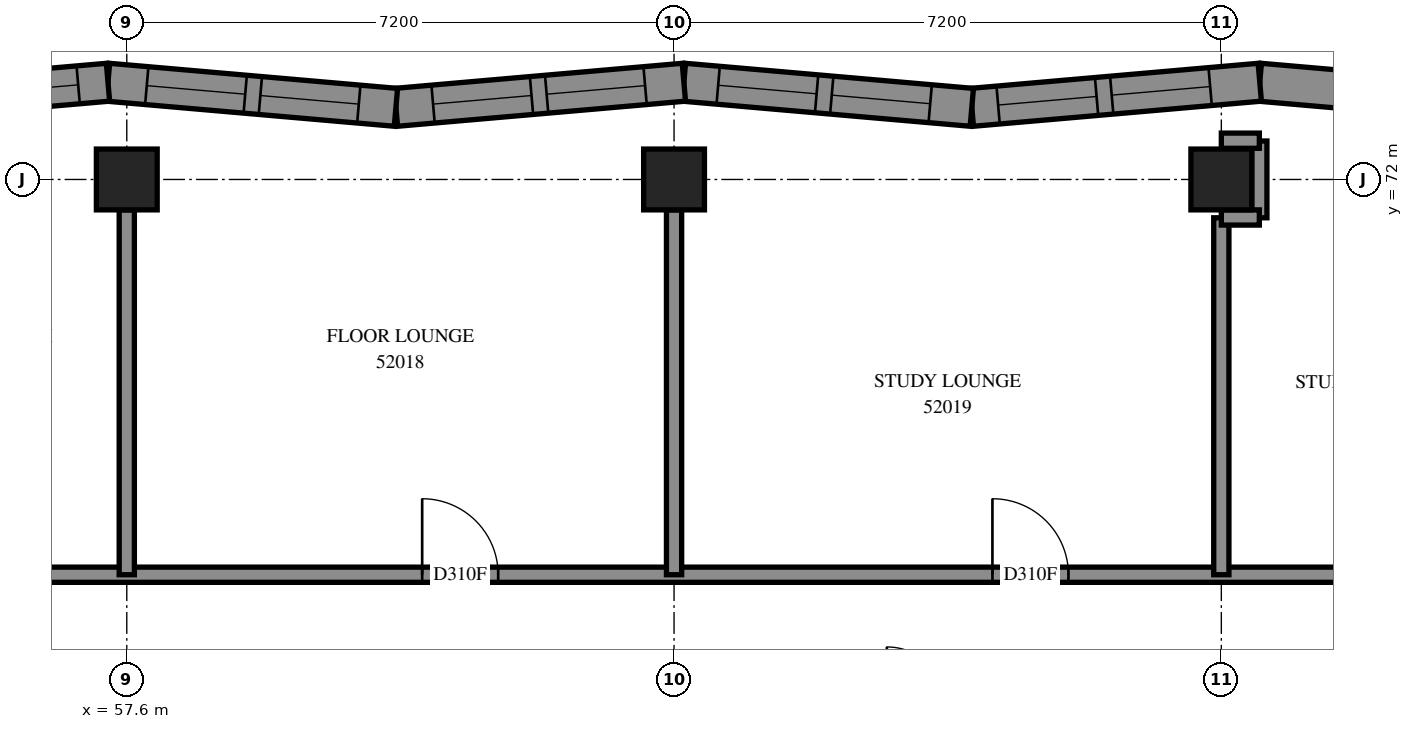
"""IFC4 building model, lengths in metres.
Left out: names, types, materials, properties, quantities, classifications, styles, units other than length and angle.
Written with IfcOpenShell. Run it as: python <this file> out.ifc"""

import sys

from ifc_helpers import new_model, si_unit, direction, frame, frame_2d, origin, origin_2d, place, context, subcontext, project, spatial, polyline, rectangle, outline, extrude, element, fill, save


model = new_model("IFC4")
c1 = context("Model", 3, precision=1e-05, world=origin(), true_north=direction((0.0, 1.0)))
c2 = subcontext(c1, "Body", "Model", "MODEL_VIEW")
j1 = project(units=[si_unit("LENGTHUNIT", "METRE"), si_unit("PLANEANGLEUNIT", "RADIAN")], contexts=[c1])
p1 = place(None, origin())
s1 = spatial("IfcSite", under=j1, at=p1, CompositionType="ELEMENT")
p2 = place(p1, origin())
s2 = spatial("IfcBuilding", under=s1, at=p2, CompositionType="ELEMENT")
p3 = place(p2, frame((0.0, 0.0, 193.0)))
s3 = spatial("IfcBuildingStorey", under=s2, at=p3, CompositionType="ELEMENT", Elevation=193.0)
for number, where, z_axis, x_axis in (
    (1, (57.6, 72.0, 0.0), (0.0, 0.0, 1.0), (1.0, 0.0, 0.0)),
    (2, (64.8, 72.0, 0.0), (0.0, 0.0, 1.0), (1.0, 0.0, 0.0)),
    (3, (72.0, 72.0, 0.0), (0.0, 0.0, 1.0), (1.0, 0.0, 0.0)),
):
    element("IfcColumn", number, at=place(p3, frame(where, z_axis=z_axis, x_axis=x_axis)), inside=s3, PredefinedType="COLUMN", context=c2, shape_type="SweptSolid", body=[
        extrude(rectangle(XDim=0.8, YDim=0.8, at=origin_2d()), origin(), (0.0, 0.0, 1.0), 3.1),
    ])
p4 = place(p3, frame((76.314, 72.947, 0.0), z_axis=(0.0, 0.0, 1.0), x_axis=(-0.9962271263, 0.0867842891, 0.0)))
e4 = element("IfcWall", 4, at=p4, inside=s3, PredefinedType="SOLIDWALL", context=c2, shape_type="SweptSolid", body=[
    extrude(outline(polyline([(0.041, -0.25), (3.844, -0.25), (3.8, 0.25), (-0.041, 0.25), (0.041, -0.25)])), origin(), (0.0, 0.0, 1.0), 3.1),
])
p5 = place(p4, frame((1.558, 0.0, 0.45)))
e5 = element("IfcOpeningElement", 5, at=p5, cuts=e4, PredefinedType="OPENING", context=c2, shape_type="SweptSolid", body=[
    extrude(rectangle(XDim=1.2, YDim=2.5, at=frame_2d((0.6, 1.25))), frame((0.0, 0.26, 0.0), z_axis=(0.0, -1.0, 0.0), x_axis=(1.0, 0.0, 0.0)), (0.0, 0.0, 1.0), 0.52),
])
p6 = place(p3, frame((72.506, 73.279, 0.0), z_axis=(0.0, 0.0, 1.0), x_axis=(-0.9962273538, -0.0867816769, 0.0)))
e6 = element("IfcWall", 6, at=p6, inside=s3, PredefinedType="SOLIDWALL", context=c2, shape_type="SweptSolid", body=[
    extrude(outline(polyline([(-0.022, -0.25), (3.781, -0.25), (3.824, 0.25), (0.022, 0.25), (-0.022, -0.25)])), origin(), (0.0, 0.0, 1.0), 3.1),
])
p7 = place(p6, frame((0.655, 0.0, 0.45)))
e7 = element("IfcOpeningElement", 7, at=p7, cuts=e6, PredefinedType="OPENING", context=c2, shape_type="SweptSolid", body=[
    extrude(rectangle(XDim=1.3, YDim=2.5, at=frame_2d((0.65, 1.25))), frame((0.0, 0.26, 0.0), z_axis=(0.0, -1.0, 0.0), x_axis=(1.0, 0.0, 0.0)), (0.0, 0.0, 1.0), 0.52),
])
p8 = place(p6, frame((2.155, 0.0, 0.45)))
e8 = element("IfcOpeningElement", 8, at=p8, cuts=e6, PredefinedType="OPENING", context=c2, shape_type="SweptSolid", body=[
    extrude(rectangle(XDim=1.3, YDim=2.5, at=frame_2d((0.65, 1.25))), frame((0.0, 0.26, 0.0), z_axis=(0.0, -1.0, 0.0), x_axis=(1.0, 0.0, 0.0)), (0.0, 0.0, 1.0), 0.52),
])
p9 = place(p3, frame((68.718, 72.949, 0.0), z_axis=(0.0, 0.0, 1.0), x_axis=(-0.9962273538, 0.0867816769, 0.0)))
e9 = element("IfcWall", 9, at=p9, inside=s3, PredefinedType="SOLIDWALL", context=c2, shape_type="SweptSolid", body=[
    extrude(outline(polyline([(0.022, -0.25), (3.824, -0.25), (3.781, 0.25), (-0.022, 0.25), (0.022, -0.25)])), origin(), (0.0, 0.0, 1.0), 3.1),
])
p10 = place(p9, frame((0.55, 0.0, 0.45)))
e10 = element("IfcOpeningElement", 10, at=p10, cuts=e9, PredefinedType="OPENING", context=c2, shape_type="SweptSolid", body=[
    extrude(rectangle(XDim=1.3, YDim=2.5, at=frame_2d((0.65, 1.25))), frame((0.0, 0.26, 0.0), z_axis=(0.0, -1.0, 0.0), x_axis=(1.0, 0.0, 0.0)), (0.0, 0.0, 1.0), 0.52),
])
p11 = place(p9, frame((2.05, 0.0, 0.45)))
e11 = element("IfcOpeningElement", 11, at=p11, cuts=e9, PredefinedType="OPENING", context=c2, shape_type="SweptSolid", body=[
    extrude(rectangle(XDim=1.3, YDim=2.5, at=frame_2d((0.65, 1.25))), frame((0.0, 0.26, 0.0), z_axis=(0.0, -1.0, 0.0), x_axis=(1.0, 0.0, 0.0)), (0.0, 0.0, 1.0), 0.52),
])
p12 = place(p3, frame((64.929, 73.279, 0.0), z_axis=(0.0, 0.0, 1.0), x_axis=(-0.9962271558, -0.0867839505, 0.0)))
e12 = element("IfcWall", 12, at=p12, inside=s3, PredefinedType="SOLIDWALL", context=c2, shape_type="SweptSolid", body=[
    extrude(outline(polyline([(-0.022, -0.25), (3.781, -0.25), (3.824, 0.25), (0.022, 0.25), (-0.022, -0.25)])), origin(), (0.0, 0.0, 1.0), 3.1),
])
p13 = place(p12, frame((0.512, 0.0, 0.45)))
e13 = element("IfcOpeningElement", 13, at=p13, cuts=e12, PredefinedType="OPENING", context=c2, shape_type="SweptSolid", body=[
    extrude(rectangle(XDim=1.3, YDim=2.5, at=frame_2d((0.65, 1.25))), frame((0.0, 0.26, 0.0), z_axis=(0.0, -1.0, 0.0), x_axis=(1.0, 0.0, 0.0)), (0.0, 0.0, 1.0), 0.52),
])
p14 = place(p12, frame((2.012, 0.0, 0.45)))
e14 = element("IfcOpeningElement", 14, at=p14, cuts=e12, PredefinedType="OPENING", context=c2, shape_type="SweptSolid", body=[
    extrude(rectangle(XDim=1.3, YDim=2.5, at=frame_2d((0.65, 1.25))), frame((0.0, 0.26, 0.0), z_axis=(0.0, -1.0, 0.0), x_axis=(1.0, 0.0, 0.0)), (0.0, 0.0, 1.0), 0.52),
])
p15 = place(p3, frame((61.141, 72.949, 0.0), z_axis=(0.0, 0.0, 1.0), x_axis=(-0.9962273538, 0.0867816769, 0.0)))
e15 = element("IfcWall", 15, at=p15, inside=s3, PredefinedType="SOLIDWALL", context=c2, shape_type="SweptSolid", body=[
    extrude(outline(polyline([(0.022, -0.25), (3.824, -0.25), (3.781, 0.25), (-0.022, 0.25), (0.022, -0.25)])), origin(), (0.0, 0.0, 1.0), 3.1),
])
p16 = place(p15, frame((0.49, 0.0, 0.45)))
e16 = element("IfcOpeningElement", 16, at=p16, cuts=e15, PredefinedType="OPENING", context=c2, shape_type="SweptSolid", body=[
    extrude(rectangle(XDim=1.3, YDim=2.5, at=frame_2d((0.65, 1.25))), frame((0.0, 0.26, 0.0), z_axis=(0.0, -1.0, 0.0), x_axis=(1.0, 0.0, 0.0)), (0.0, 0.0, 1.0), 0.52),
])
p17 = place(p15, frame((1.99, 0.0, 0.45)))
e17 = element("IfcOpeningElement", 17, at=p17, cuts=e15, PredefinedType="OPENING", context=c2, shape_type="SweptSolid", body=[
    extrude(rectangle(XDim=1.3, YDim=2.5, at=frame_2d((0.65, 1.25))), frame((0.0, 0.26, 0.0), z_axis=(0.0, -1.0, 0.0), x_axis=(1.0, 0.0, 0.0)), (0.0, 0.0, 1.0), 0.52),
])
p18 = place(p3, frame((57.353, 73.279, 0.0), z_axis=(0.0, 0.0, 1.0), x_axis=(-0.9962273538, -0.0867816769, 0.0)))
e18 = element("IfcWall", 18, at=p18, inside=s3, PredefinedType="SOLIDWALL", context=c2, shape_type="SweptSolid", body=[
    extrude(outline(polyline([(-0.022, -0.25), (3.781, -0.25), (3.824, 0.25), (0.022, 0.25), (-0.022, -0.25)])), origin(), (0.0, 0.0, 1.0), 3.1),
])
p19 = place(p18, frame((0.394, 0.0, 0.45)))
e19 = element("IfcOpeningElement", 19, at=p19, cuts=e18, PredefinedType="OPENING", context=c2, shape_type="SweptSolid", body=[
    extrude(rectangle(XDim=1.3, YDim=2.5, at=frame_2d((0.65, 1.25))), frame((0.0, 0.26, 0.0), z_axis=(0.0, -1.0, 0.0), x_axis=(1.0, 0.0, 0.0)), (0.0, 0.0, 1.0), 0.52),
])
p20 = place(p18, frame((1.894, 0.0, 0.45)))
e20 = element("IfcOpeningElement", 20, at=p20, cuts=e18, PredefinedType="OPENING", context=c2, shape_type="SweptSolid", body=[
    extrude(rectangle(XDim=1.3, YDim=2.5, at=frame_2d((0.65, 1.25))), frame((0.0, 0.26, 0.0), z_axis=(0.0, -1.0, 0.0), x_axis=(1.0, 0.0, 0.0)), (0.0, 0.0, 1.0), 0.52),
])
p21 = place(p3, frame((55.6, 66.8, 0.0), z_axis=(0.0, 0.0, 1.0), x_axis=(1.0, 0.0, 0.0)))
e21 = element("IfcWall", 21, at=p21, inside=s3, PredefinedType="PARTITIONING", context=c2, shape_type="SweptSolid", body=[
    extrude(rectangle(XDim=18.4, YDim=0.2, at=frame_2d((9.2, 0.0))), origin(), (0.0, 0.0, 1.0), 3.1),
])
p22 = place(p21, frame((5.886, 0.0, 0.0)))
e22 = element("IfcOpeningElement", 22, at=p22, cuts=e21, PredefinedType="OPENING", context=c2, shape_type="SweptSolid", body=[
    extrude(rectangle(XDim=1.0, YDim=2.1, at=frame_2d((0.5, 1.05))), frame((0.0, 0.11, 0.0), z_axis=(0.0, -1.0, 0.0), x_axis=(1.0, 0.0, 0.0)), (0.0, 0.0, 1.0), 0.22),
])
p23 = place(p21, frame((13.389, 0.0, 0.0)))
e23 = element("IfcOpeningElement", 23, at=p23, cuts=e21, PredefinedType="OPENING", context=c2, shape_type="SweptSolid", body=[
    extrude(rectangle(XDim=1.0, YDim=2.1, at=frame_2d((0.5, 1.05))), frame((0.0, 0.11, 0.0), z_axis=(0.0, -1.0, 0.0), x_axis=(1.0, 0.0, 0.0)), (0.0, 0.0, 1.0), 0.22),
])
for number, where, z_axis, x_axis in (
    (24, (57.6, 66.8, 0.0), (0.0, 0.0, 1.0), (0.0, 1.0, 0.0)),
    (25, (64.8, 66.8, 0.0), (0.0, 0.0, 1.0), (0.0, 1.0, 0.0)),
):
    element("IfcWall", number, at=place(p3, frame(where, z_axis=z_axis, x_axis=x_axis)), inside=s3, PredefinedType="PARTITIONING", context=c2, shape_type="SweptSolid", body=[
        extrude(rectangle(XDim=4.8, YDim=0.2, at=frame_2d((2.4, 0.0))), origin(), (0.0, 0.0, 1.0), 3.1),
    ])
p24 = place(p3, frame((72.0, 66.8, 0.0), z_axis=(0.0, 0.0, 1.0), x_axis=(0.0, 1.0, 0.0)))
e26 = element("IfcWall", 26, at=p24, inside=s3, PredefinedType="PARTITIONING", context=c2, shape_type="SweptSolid", body=[
    extrude(rectangle(XDim=4.696, YDim=0.2, at=frame_2d((2.348, 0.0))), origin(), (0.0, 0.0, 1.0), 3.1),
])
p25 = place(p3, frame((72.5, 71.496, 0.0), z_axis=(0.0, 0.0, 1.0), x_axis=(0.0, 1.0, 0.0)))
e27 = element("IfcWall", 27, at=p25, inside=s3, PredefinedType="PARTITIONING", context=c2, shape_type="SweptSolid", body=[
    extrude(rectangle(XDim=1.01, YDim=0.2, at=frame_2d((0.505, 0.0))), origin(), (0.0, 0.0, 1.0), 3.1),
])
for number, where, z_axis, x_axis in (
    (28, (72.0, 72.51, 0.0), (0.0, 0.0, 1.0), (1.0, 0.0, 0.0)),
    (29, (72.0, 71.5, 0.0), (0.0, 0.0, 1.0), (1.0, 0.0, 0.0)),
):
    element("IfcWall", number, at=place(p3, frame(where, z_axis=z_axis, x_axis=x_axis)), inside=s3, PredefinedType="PARTITIONING", context=c2, shape_type="SweptSolid", body=[
        extrude(rectangle(XDim=0.5, YDim=0.2, at=frame_2d((0.25, 0.0))), origin(), (0.0, 0.0, 1.0), 3.1),
    ])
p26 = place(p7, origin())
e30 = element("IfcWindow", 30, at=p26, inside=s3, PartitioningType="SINGLE_PANEL", PredefinedType="WINDOW", context=c2, shape_type="SweptSolid", body=[
    extrude(rectangle(XDim=1.3, YDim=2.5, at=frame_2d((0.65, 1.25))), frame((0.0, 0.18, 0.0), z_axis=(0.0, -1.0, 0.0), x_axis=(1.0, 0.0, 0.0)), (0.0, 0.0, 1.0), 0.06),
])
fill(e7, e30)
p27 = place(p8, origin())
e31 = element("IfcWindow", 31, at=p27, inside=s3, PartitioningType="SINGLE_PANEL", PredefinedType="WINDOW", context=c2, shape_type="SweptSolid", body=[
    extrude(rectangle(XDim=1.3, YDim=2.5, at=frame_2d((0.65, 1.25))), frame((0.0, 0.18, 0.0), z_axis=(0.0, -1.0, 0.0), x_axis=(1.0, 0.0, 0.0)), (0.0, 0.0, 1.0), 0.06),
])
fill(e8, e31)
p28 = place(p10, origin())
e32 = element("IfcWindow", 32, at=p28, inside=s3, PartitioningType="SINGLE_PANEL", PredefinedType="WINDOW", context=c2, shape_type="SweptSolid", body=[
    extrude(rectangle(XDim=1.3, YDim=2.5, at=frame_2d((0.65, 1.25))), frame((0.0, 0.18, 0.0), z_axis=(0.0, -1.0, 0.0), x_axis=(1.0, 0.0, 0.0)), (0.0, 0.0, 1.0), 0.06),
])
fill(e10, e32)
p29 = place(p11, origin())
e33 = element("IfcWindow", 33, at=p29, inside=s3, PartitioningType="SINGLE_PANEL", PredefinedType="WINDOW", context=c2, shape_type="SweptSolid", body=[
    extrude(rectangle(XDim=1.3, YDim=2.5, at=frame_2d((0.65, 1.25))), frame((0.0, 0.18, 0.0), z_axis=(0.0, -1.0, 0.0), x_axis=(1.0, 0.0, 0.0)), (0.0, 0.0, 1.0), 0.06),
])
fill(e11, e33)
p30 = place(p13, origin())
e34 = element("IfcWindow", 34, at=p30, inside=s3, PartitioningType="SINGLE_PANEL", PredefinedType="WINDOW", context=c2, shape_type="SweptSolid", body=[
    extrude(rectangle(XDim=1.3, YDim=2.5, at=frame_2d((0.65, 1.25))), frame((0.0, 0.18, 0.0), z_axis=(0.0, -1.0, 0.0), x_axis=(1.0, 0.0, 0.0)), (0.0, 0.0, 1.0), 0.06),
])
fill(e13, e34)
p31 = place(p14, origin())
e35 = element("IfcWindow", 35, at=p31, inside=s3, PartitioningType="SINGLE_PANEL", PredefinedType="WINDOW", context=c2, shape_type="SweptSolid", body=[
    extrude(rectangle(XDim=1.3, YDim=2.5, at=frame_2d((0.65, 1.25))), frame((0.0, 0.18, 0.0), z_axis=(0.0, -1.0, 0.0), x_axis=(1.0, 0.0, 0.0)), (0.0, 0.0, 1.0), 0.06),
])
fill(e14, e35)
p32 = place(p16, origin())
e36 = element("IfcWindow", 36, at=p32, inside=s3, PartitioningType="SINGLE_PANEL", PredefinedType="WINDOW", context=c2, shape_type="SweptSolid", body=[
    extrude(rectangle(XDim=1.3, YDim=2.5, at=frame_2d((0.65, 1.25))), frame((0.0, 0.18, 0.0), z_axis=(0.0, -1.0, 0.0), x_axis=(1.0, 0.0, 0.0)), (0.0, 0.0, 1.0), 0.06),
])
fill(e16, e36)
p33 = place(p17, origin())
e37 = element("IfcWindow", 37, at=p33, inside=s3, PartitioningType="SINGLE_PANEL", PredefinedType="WINDOW", context=c2, shape_type="SweptSolid", body=[
    extrude(rectangle(XDim=1.3, YDim=2.5, at=frame_2d((0.65, 1.25))), frame((0.0, 0.18, 0.0), z_axis=(0.0, -1.0, 0.0), x_axis=(1.0, 0.0, 0.0)), (0.0, 0.0, 1.0), 0.06),
])
fill(e17, e37)
p34 = place(p19, origin())
e38 = element("IfcWindow", 38, at=p34, inside=s3, PartitioningType="SINGLE_PANEL", PredefinedType="WINDOW", context=c2, shape_type="SweptSolid", body=[
    extrude(rectangle(XDim=1.3, YDim=2.5, at=frame_2d((0.65, 1.25))), frame((0.0, 0.18, 0.0), z_axis=(0.0, -1.0, 0.0), x_axis=(1.0, 0.0, 0.0)), (0.0, 0.0, 1.0), 0.06),
])
fill(e19, e38)
p35 = place(p22, origin())
e39 = element("IfcDoor", 39, at=p35, inside=s3, OperationType="SINGLE_SWING_RIGHT", PredefinedType="DOOR", context=c2, shape_type="SweptSolid", body=[
    extrude(rectangle(XDim=1.0, YDim=2.1, at=frame_2d((0.5, 1.05))), frame((0.0, 0.025, 0.0), z_axis=(0.0, -1.0, 0.0), x_axis=(1.0, 0.0, 0.0)), (0.0, 0.0, 1.0), 0.05),
])
fill(e22, e39)
p36 = place(p23, origin())
e40 = element("IfcDoor", 40, at=p36, inside=s3, OperationType="SINGLE_SWING_RIGHT", PredefinedType="DOOR", context=c2, shape_type="SweptSolid", body=[
    extrude(rectangle(XDim=1.0, YDim=2.1, at=frame_2d((0.5, 1.05))), frame((0.0, 0.025, 0.0), z_axis=(0.0, -1.0, 0.0), x_axis=(1.0, 0.0, 0.0)), (0.0, 0.0, 1.0), 0.05),
])
fill(e23, e40)
save(model, sys.argv[1])
